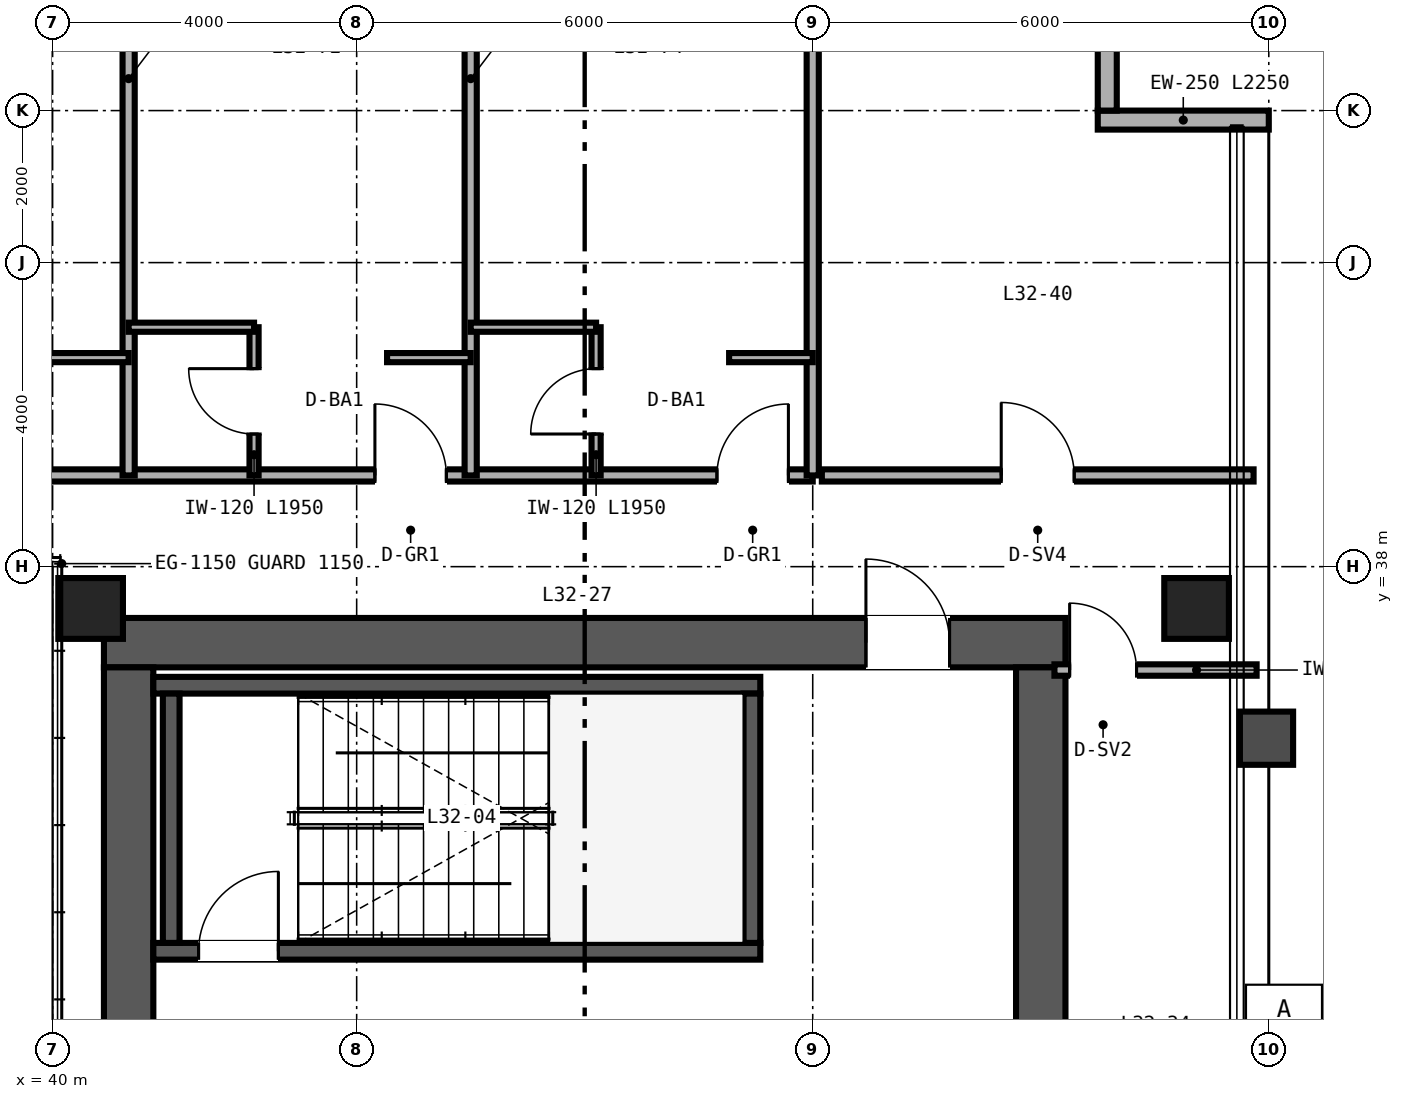
"""IFC4 building model, lengths in metres.
Left out: names, types, materials, properties, quantities, classifications, styles, units other than length and angle.
Written with IfcOpenShell. Run it as: python <this file> out.ifc"""

import sys

from ifc_helpers import new_model, si_unit, direction, frame, frame_2d, origin, origin_2d, place, context, subcontext, project, spatial, rectangle, hollow_rectangle, extrude, source, transform, mapped, element, fill, save


model = new_model("IFC4")
c1 = context("Model", 3, precision=1e-05, world=origin(), true_north=direction((0.0, 1.0)))
c2 = subcontext(c1, "Body", "Model", "MODEL_VIEW")
j1 = project(units=[si_unit("LENGTHUNIT", "METRE"), si_unit("PLANEANGLEUNIT", "RADIAN")], contexts=[c1])
p1 = place(None, origin())
s1 = spatial("IfcSite", under=j1, at=p1, CompositionType="ELEMENT")
p2 = place(p1, origin())
s2 = spatial("IfcBuilding", under=s1, at=p2, CompositionType="ELEMENT")
p3 = place(p2, frame((0.0, 0.0, 129.6)))
s3 = spatial("IfcBuildingStorey", under=s2, at=p3, CompositionType="ELEMENT", Elevation=129.6)
p4 = place(p3, frame((40.675, 37.0, 0.0), z_axis=(0.0, 0.0, 1.0), x_axis=(1.0, 0.0, 0.0)))
e1 = element("IfcWall", 1, at=p4, inside=s3, PredefinedType="SHEAR", context=c2, shape_type="SweptSolid", body=[
    extrude(rectangle(XDim=12.65, YDim=0.65, at=frame_2d((6.325, 0.0))), origin(), (0.0, 0.0, 1.0), 3.36),
])
p5 = place(p4, frame((10.025, 0.0, 0.0)))
e2 = element("IfcOpeningElement", 2, at=p5, cuts=e1, PredefinedType="OPENING", context=c2, shape_type="SweptSolid", body=[
    extrude(rectangle(XDim=1.1, YDim=2.15, at=frame_2d((0.55, 1.075))), frame((0.0, 0.335, 0.0), z_axis=(0.0, -1.0, 0.0), x_axis=(1.0, 0.0, 0.0)), (0.0, 0.0, 1.0), 0.67),
])
for number, where, z_axis, x_axis in (
    (3, (41.0, 15.325, 0.0), (0.0, 0.0, 1.0), (0.0, 1.0, 0.0)),
    (4, (53.0, 15.325, 0.0), (0.0, 0.0, 1.0), (0.0, 1.0, 0.0)),
):
    element("IfcWall", number, at=place(p3, frame(where, z_axis=z_axis, x_axis=x_axis)), inside=s3, PredefinedType="SHEAR", context=c2, shape_type="SweptSolid", body=[
        extrude(rectangle(XDim=21.35, YDim=0.65, at=frame_2d((10.675, 0.0))), origin(), (0.0, 0.0, 1.0), 3.36),
    ])
p6 = place(p3, frame((41.325, 32.94, 0.0), z_axis=(0.0, 0.0, 1.0), x_axis=(1.0, 0.0, 0.0)))
e5 = element("IfcWall", 5, at=p6, inside=s3, PredefinedType="SHEAR", context=c2, shape_type="SweptSolid", body=[
    extrude(rectangle(XDim=7.985, YDim=0.22, at=frame_2d((3.993, 0.0))), origin(), (0.0, 0.0, 1.0), 3.4),
])
p7 = place(p6, frame((0.595, 0.0, 0.0)))
e6 = element("IfcOpeningElement", 6, at=p7, cuts=e5, PredefinedType="OPENING", context=c2, shape_type="SweptSolid", body=[
    extrude(rectangle(XDim=1.05, YDim=2.15, at=frame_2d((0.525, 1.075))), frame((0.0, 0.12, 0.0), z_axis=(0.0, -1.0, 0.0), x_axis=(1.0, 0.0, 0.0)), (0.0, 0.0, 1.0), 0.24),
])
p8 = place(p3, frame((41.325, 36.44, 0.0), z_axis=(0.0, 0.0, 1.0), x_axis=(1.0, 0.0, 0.0)))
e7 = element("IfcWall", 7, at=p8, inside=s3, PredefinedType="SHEAR", context=c2, shape_type="SweptSolid", body=[
    extrude(rectangle(XDim=7.985, YDim=0.22, at=frame_2d((3.993, 0.0))), origin(), (0.0, 0.0, 1.0), 3.4),
])
for number, where, z_axis, x_axis in (
    (8, (41.56, 33.05, 0.0), (0.0, 0.0, 1.0), (0.0, 1.0, 0.0)),
    (9, (49.2, 33.05, 0.0), (0.0, 0.0, 1.0), (0.0, 1.0, 0.0)),
):
    element("IfcWall", number, at=place(p3, frame(where, z_axis=z_axis, x_axis=x_axis)), inside=s3, PredefinedType="SHEAR", context=c2, shape_type="SweptSolid", body=[
        extrude(rectangle(XDim=3.28, YDim=0.22, at=frame_2d((1.64, 0.0))), origin(), (0.0, 0.0, 1.0), 3.4),
    ])
m1 = source(origin(), c2, "Body", "SweptSolid", [
    extrude(hollow_rectangle(XDim=0.85, YDim=0.8, WallThickness=0.032, at=origin_2d()), origin(), (0.0, 0.0, 1.0), 3.36),
])
for number, where, z_axis, x_axis in (
    (10, (40.5, 37.45, 0.0), (0.0, 0.0, 1.0), (1.0, 0.0, 0.0)),
    (11, (55.05, 37.45, 0.0), (0.0, 0.0, 1.0), (1.0, 0.0, 0.0)),
):
    element("IfcColumn", number, at=place(p3, frame(where, z_axis=z_axis, x_axis=x_axis)), inside=s3, PredefinedType="COLUMN", context=c2, shape_type="MappedRepresentation", body=[
        mapped(m1, transform((0.0, 0.0, 0.0), scale=1.0)),
    ])
p9 = place(p3, frame((56.0, 43.875, 0.0), z_axis=(0.0, 0.0, 1.0), x_axis=(-1.0, 0.0, 0.0)))
e12 = element("IfcWall", 12, at=p9, inside=s3, PredefinedType="SOLIDWALL", context=c2, shape_type="SweptSolid", body=[
    extrude(rectangle(XDim=2.25, YDim=0.25, at=frame_2d((1.125, 0.0))), origin(), (0.0, 0.0, 1.0), 3.36),
])
p10 = place(p3, frame((53.875, 44.0, 0.0), z_axis=(0.0, 0.0, 1.0), x_axis=(0.0, 1.0, 0.0)))
e13 = element("IfcWall", 13, at=p10, inside=s3, PredefinedType="SOLIDWALL", context=c2, shape_type="SweptSolid", body=[
    extrude(rectangle(XDim=2.0, YDim=0.25, at=frame_2d((1.0, 0.0))), origin(), (0.0, 0.0, 1.0), 3.36),
])
p11 = place(p3, frame((53.18, 36.64, 0.0), z_axis=(0.0, 0.0, 1.0), x_axis=(1.0, 0.0, 0.0)))
e14 = element("IfcWall", 14, at=p11, inside=s3, PredefinedType="PARTITIONING", context=c2, shape_type="SweptSolid", body=[
    extrude(rectangle(XDim=2.66, YDim=0.15, at=frame_2d((1.33, 0.0))), origin(), (0.0, 0.0, 1.0), 2.743),
])
p12 = place(p11, frame((0.2, 0.0, 0.0)))
e15 = element("IfcOpeningElement", 15, at=p12, cuts=e14, PredefinedType="OPENING", context=c2, shape_type="SweptSolid", body=[
    extrude(rectangle(XDim=0.88, YDim=2.15, at=frame_2d((0.44, 1.075))), frame((0.0, 0.085, 0.0), z_axis=(0.0, -1.0, 0.0), x_axis=(1.0, 0.0, 0.0)), (0.0, 0.0, 1.0), 0.17),
])
p13 = place(p3, frame((50.12, 39.2, 0.0), z_axis=(0.0, 0.0, 1.0), x_axis=(1.0, 0.0, 0.0)))
e16 = element("IfcWall", 16, at=p13, inside=s3, PredefinedType="PARTITIONING", context=c2, shape_type="SweptSolid", body=[
    extrude(rectangle(XDim=5.68, YDim=0.16, at=frame_2d((2.84, 0.0))), origin(), (0.0, 0.0, 1.0), 3.36),
])
p14 = place(p13, frame((2.36, 0.0, 0.0)))
e17 = element("IfcOpeningElement", 17, at=p14, cuts=e16, PredefinedType="OPENING", context=c2, shape_type="SweptSolid", body=[
    extrude(rectangle(XDim=0.96, YDim=2.15, at=frame_2d((0.48, 1.075))), frame((0.0, 0.09, 0.0), z_axis=(0.0, -1.0, 0.0), x_axis=(1.0, 0.0, 0.0)), (0.0, 0.0, 1.0), 0.18),
])
p15 = place(p3, frame((14.0, 39.2, 0.0), z_axis=(0.0, 0.0, 1.0), x_axis=(1.0, 0.0, 0.0)))
e18 = element("IfcWall", 18, at=p15, inside=s3, PredefinedType="PARTITIONING", context=c2, shape_type="SweptSolid", body=[
    extrude(rectangle(XDim=36.0, YDim=0.16, at=frame_2d((18.0, 0.0))), origin(), (0.0, 0.0, 1.0), 2.581),
])
p16 = place(p15, frame((3.14, 0.0, 0.0)))
e19 = element("IfcOpeningElement", 19, at=p16, cuts=e18, PredefinedType="OPENING", context=c2, shape_type="SweptSolid", body=[
    extrude(rectangle(XDim=0.94, YDim=2.15, at=frame_2d((0.47, 1.075))), frame((0.0, 0.09, 0.0), z_axis=(0.0, -1.0, 0.0), x_axis=(1.0, 0.0, 0.0)), (0.0, 0.0, 1.0), 0.18),
])
p17 = place(p15, frame((7.54, 0.0, 0.0)))
e20 = element("IfcOpeningElement", 20, at=p17, cuts=e18, PredefinedType="OPENING", context=c2, shape_type="SweptSolid", body=[
    extrude(rectangle(XDim=0.94, YDim=2.15, at=frame_2d((0.47, 1.075))), frame((0.0, 0.09, 0.0), z_axis=(0.0, -1.0, 0.0), x_axis=(1.0, 0.0, 0.0)), (0.0, 0.0, 1.0), 0.18),
])
p18 = place(p15, frame((11.94, 0.0, 0.0)))
e21 = element("IfcOpeningElement", 21, at=p18, cuts=e18, PredefinedType="OPENING", context=c2, shape_type="SweptSolid", body=[
    extrude(rectangle(XDim=0.94, YDim=2.15, at=frame_2d((0.47, 1.075))), frame((0.0, 0.09, 0.0), z_axis=(0.0, -1.0, 0.0), x_axis=(1.0, 0.0, 0.0)), (0.0, 0.0, 1.0), 0.18),
])
p19 = place(p15, frame((15.02, 0.0, 0.0)))
e22 = element("IfcOpeningElement", 22, at=p19, cuts=e18, PredefinedType="OPENING", context=c2, shape_type="SweptSolid", body=[
    extrude(rectangle(XDim=0.96, YDim=2.15, at=frame_2d((0.48, 1.075))), frame((0.0, 0.09, 0.0), z_axis=(0.0, -1.0, 0.0), x_axis=(1.0, 0.0, 0.0)), (0.0, 0.0, 1.0), 0.18),
])
p20 = place(p15, frame((21.14, 0.0, 0.0)))
e23 = element("IfcOpeningElement", 23, at=p20, cuts=e18, PredefinedType="OPENING", context=c2, shape_type="SweptSolid", body=[
    extrude(rectangle(XDim=0.94, YDim=2.15, at=frame_2d((0.47, 1.075))), frame((0.0, 0.09, 0.0), z_axis=(0.0, -1.0, 0.0), x_axis=(1.0, 0.0, 0.0)), (0.0, 0.0, 1.0), 0.18),
])
p21 = place(p15, frame((24.79, 0.0, 0.0)))
e24 = element("IfcOpeningElement", 24, at=p21, cuts=e18, PredefinedType="OPENING", context=c2, shape_type="SweptSolid", body=[
    extrude(rectangle(XDim=0.94, YDim=2.15, at=frame_2d((0.47, 1.075))), frame((0.0, 0.09, 0.0), z_axis=(0.0, -1.0, 0.0), x_axis=(1.0, 0.0, 0.0)), (0.0, 0.0, 1.0), 0.18),
])
p22 = place(p15, frame((30.24, 0.0, 0.0)))
e25 = element("IfcOpeningElement", 25, at=p22, cuts=e18, PredefinedType="OPENING", context=c2, shape_type="SweptSolid", body=[
    extrude(rectangle(XDim=0.94, YDim=2.15, at=frame_2d((0.47, 1.075))), frame((0.0, 0.09, 0.0), z_axis=(0.0, -1.0, 0.0), x_axis=(1.0, 0.0, 0.0)), (0.0, 0.0, 1.0), 0.18),
])
p23 = place(p15, frame((34.74, 0.0, 0.0)))
e26 = element("IfcOpeningElement", 26, at=p23, cuts=e18, PredefinedType="OPENING", context=c2, shape_type="SweptSolid", body=[
    extrude(rectangle(XDim=0.94, YDim=2.15, at=frame_2d((0.47, 1.075))), frame((0.0, 0.09, 0.0), z_axis=(0.0, -1.0, 0.0), x_axis=(1.0, 0.0, 0.0)), (0.0, 0.0, 1.0), 0.18),
])
p24 = place(p3, frame((50.0, 39.2, 0.0), z_axis=(0.0, 0.0, 1.0), x_axis=(0.0, 1.0, 0.0)))
e27 = element("IfcWall", 27, at=p24, inside=s3, PredefinedType="PARTITIONING", context=c2, shape_type="SweptSolid", body=[
    extrude(rectangle(XDim=10.44, YDim=0.16, at=frame_2d((5.22, 0.0))), origin(), (0.0, 0.0, 1.0), 2.667),
])
p25 = place(p3, frame((41.0, 39.2, 0.0), z_axis=(0.0, 0.0, 1.0), x_axis=(0.0, 1.0, 0.0)))
e28 = element("IfcWall", 28, at=p25, inside=s3, PredefinedType="PARTITIONING", context=c2, shape_type="SweptSolid", body=[
    extrude(rectangle(XDim=10.44, YDim=0.16, at=frame_2d((5.22, 0.0))), origin(), (0.0, 0.0, 1.0), 2.823),
])
p26 = place(p3, frame((39.9, 40.75, 0.0), z_axis=(0.0, 0.0, 1.0), x_axis=(1.0, 0.0, 0.0)))
e29 = element("IfcWall", 29, at=p26, inside=s3, PredefinedType="PARTITIONING", context=c2, shape_type="SweptSolid", body=[
    extrude(rectangle(XDim=1.1, YDim=0.12, at=frame_2d((0.55, 0.0))), origin(), (0.0, 0.0, 1.0), 2.581),
])
p27 = place(p3, frame((45.5, 39.2, 0.0), z_axis=(0.0, 0.0, 1.0), x_axis=(0.0, 1.0, 0.0)))
e30 = element("IfcWall", 30, at=p27, inside=s3, PredefinedType="PARTITIONING", context=c2, shape_type="SweptSolid", body=[
    extrude(rectangle(XDim=10.44, YDim=0.16, at=frame_2d((5.22, 0.0))), origin(), (0.0, 0.0, 1.0), 2.667),
])
p28 = place(p3, frame((42.65, 39.2, 0.0), z_axis=(0.0, 0.0, 1.0), x_axis=(0.0, 1.0, 0.0)))
e31 = element("IfcWall", 31, at=p28, inside=s3, PredefinedType="PARTITIONING", context=c2, shape_type="SweptSolid", body=[
    extrude(rectangle(XDim=1.95, YDim=0.12, at=frame_2d((0.975, 0.0))), origin(), (0.0, 0.0, 1.0), 3.36),
])
p29 = place(p28, frame((0.545, 0.0, 0.0)))
e32 = element("IfcOpeningElement", 32, at=p29, cuts=e31, PredefinedType="OPENING", context=c2, shape_type="SweptSolid", body=[
    extrude(rectangle(XDim=0.86, YDim=2.1, at=frame_2d((0.43, 1.05))), frame((0.0, 0.07, 0.0), z_axis=(0.0, -1.0, 0.0), x_axis=(1.0, 0.0, 0.0)), (0.0, 0.0, 1.0), 0.14),
])
p30 = place(p3, frame((41.0, 41.15, 0.0), z_axis=(0.0, 0.0, 1.0), x_axis=(1.0, 0.0, 0.0)))
e33 = element("IfcWall", 33, at=p30, inside=s3, PredefinedType="PARTITIONING", context=c2, shape_type="SweptSolid", body=[
    extrude(rectangle(XDim=1.65, YDim=0.12, at=frame_2d((0.825, 0.0))), origin(), (0.0, 0.0, 1.0), 3.36),
])
p31 = place(p3, frame((44.4, 40.75, 0.0), z_axis=(0.0, 0.0, 1.0), x_axis=(1.0, 0.0, 0.0)))
e34 = element("IfcWall", 34, at=p31, inside=s3, PredefinedType="PARTITIONING", context=c2, shape_type="SweptSolid", body=[
    extrude(rectangle(XDim=1.1, YDim=0.12, at=frame_2d((0.55, 0.0))), origin(), (0.0, 0.0, 1.0), 3.36),
])
p32 = place(p3, frame((47.15, 39.2, 0.0), z_axis=(0.0, 0.0, 1.0), x_axis=(0.0, 1.0, 0.0)))
e35 = element("IfcWall", 35, at=p32, inside=s3, PredefinedType="PARTITIONING", context=c2, shape_type="SweptSolid", body=[
    extrude(rectangle(XDim=1.95, YDim=0.12, at=frame_2d((0.975, 0.0))), origin(), (0.0, 0.0, 1.0), 3.36),
])
p33 = place(p32, frame((0.545, 0.0, 0.0)))
e36 = element("IfcOpeningElement", 36, at=p33, cuts=e35, PredefinedType="OPENING", context=c2, shape_type="SweptSolid", body=[
    extrude(rectangle(XDim=0.86, YDim=2.1, at=frame_2d((0.43, 1.05))), frame((0.0, 0.07, 0.0), z_axis=(0.0, -1.0, 0.0), x_axis=(1.0, 0.0, 0.0)), (0.0, 0.0, 1.0), 0.14),
])
p34 = place(p3, frame((45.5, 41.15, 0.0), z_axis=(0.0, 0.0, 1.0), x_axis=(1.0, 0.0, 0.0)))
e37 = element("IfcWall", 37, at=p34, inside=s3, PredefinedType="PARTITIONING", context=c2, shape_type="SweptSolid", body=[
    extrude(rectangle(XDim=1.65, YDim=0.12, at=frame_2d((0.825, 0.0))), origin(), (0.0, 0.0, 1.0), 3.36),
])
p35 = place(p3, frame((48.9, 40.75, 0.0), z_axis=(0.0, 0.0, 1.0), x_axis=(1.0, 0.0, 0.0)))
e38 = element("IfcWall", 38, at=p35, inside=s3, PredefinedType="PARTITIONING", context=c2, shape_type="SweptSolid", body=[
    extrude(rectangle(XDim=1.1, YDim=0.12, at=frame_2d((0.55, 0.0))), origin(), (0.0, 0.0, 1.0), 3.36),
])
m2 = source(origin(), c2, "Body", "SweptSolid", [
    extrude(rectangle(XDim=1.05, YDim=2.15, at=frame_2d((0.525, 1.075))), frame((0.0, 0.025, 0.0), z_axis=(0.0, -1.0, 0.0), x_axis=(1.0, 0.0, 0.0)), (0.0, 0.0, 1.0), 0.05),
])
p36 = place(p7, origin())
e39 = element("IfcDoor", 39, at=p36, inside=s3, OperationType="SINGLE_SWING_RIGHT", PredefinedType="DOOR", context=c2, shape_type="MappedRepresentation", body=[
    mapped(m2, transform((0.0, 0.0, 0.0), scale=1.0)),
])
fill(e6, e39)
m3 = source(origin(), c2, "Body", "SweptSolid", [
    extrude(rectangle(XDim=1.1, YDim=2.15, at=frame_2d((0.55, 1.075))), frame((0.0, 0.025, 0.0), z_axis=(0.0, -1.0, 0.0), x_axis=(1.0, 0.0, 0.0)), (0.0, 0.0, 1.0), 0.05),
])
p37 = place(p5, origin())
e40 = element("IfcDoor", 40, at=p37, inside=s3, OperationType="SINGLE_SWING_LEFT", PredefinedType="DOOR", context=c2, shape_type="MappedRepresentation", body=[
    mapped(m3, transform((0.0, 0.0, 0.0), scale=1.0)),
])
fill(e2, e40)
m4 = source(origin(), c2, "Body", "SweptSolid", [
    extrude(rectangle(XDim=0.88, YDim=2.15, at=frame_2d((0.44, 1.075))), frame((0.0, 0.025, 0.0), z_axis=(0.0, -1.0, 0.0), x_axis=(1.0, 0.0, 0.0)), (0.0, 0.0, 1.0), 0.05),
])
p38 = place(p12, origin())
e41 = element("IfcDoor", 41, at=p38, inside=s3, OperationType="SINGLE_SWING_LEFT", PredefinedType="DOOR", context=c2, shape_type="MappedRepresentation", body=[
    mapped(m4, transform((0.0, 0.0, 0.0), scale=1.0)),
])
fill(e15, e41)
m5 = source(origin(), c2, "Body", "SweptSolid", [
    extrude(rectangle(XDim=0.96, YDim=2.15, at=frame_2d((0.48, 1.075))), frame((0.0, 0.025, 0.0), z_axis=(0.0, -1.0, 0.0), x_axis=(1.0, 0.0, 0.0)), (0.0, 0.0, 1.0), 0.05),
])
p39 = place(p14, origin())
e42 = element("IfcDoor", 42, at=p39, inside=s3, OperationType="SINGLE_SWING_LEFT", PredefinedType="DOOR", context=c2, shape_type="MappedRepresentation", body=[
    mapped(m5, transform((0.0, 0.0, 0.0), scale=1.0)),
])
fill(e17, e42)
m6 = source(origin(), c2, "Body", "SweptSolid", [
    extrude(rectangle(XDim=0.86, YDim=2.1, at=frame_2d((0.43, 1.05))), frame((0.0, 0.025, 0.0), z_axis=(0.0, -1.0, 0.0), x_axis=(1.0, 0.0, 0.0)), (0.0, 0.0, 1.0), 0.05),
])
p40 = place(p29, origin())
e43 = element("IfcDoor", 43, at=p40, inside=s3, OperationType="SINGLE_SWING_RIGHT", PredefinedType="DOOR", context=c2, shape_type="MappedRepresentation", body=[
    mapped(m6, transform((0.0, 0.0, 0.0), scale=1.0)),
])
fill(e32, e43)
p41 = place(p33, origin())
e44 = element("IfcDoor", 44, at=p41, inside=s3, OperationType="SINGLE_SWING_LEFT", PredefinedType="DOOR", context=c2, shape_type="MappedRepresentation", body=[
    mapped(m6, transform((0.0, 0.0, 0.0), scale=1.0)),
])
fill(e36, e44)
m7 = source(origin(), c2, "Body", "SweptSolid", [
    extrude(rectangle(XDim=0.94, YDim=2.15, at=frame_2d((0.47, 1.075))), frame((0.0, 0.025, 0.0), z_axis=(0.0, -1.0, 0.0), x_axis=(1.0, 0.0, 0.0)), (0.0, 0.0, 1.0), 0.05),
])
p42 = place(p22, origin())
e45 = element("IfcDoor", 45, at=p42, inside=s3, OperationType="SINGLE_SWING_LEFT", PredefinedType="DOOR", context=c2, shape_type="MappedRepresentation", body=[
    mapped(m7, transform((0.0, 0.0, 0.0), scale=1.0)),
])
fill(e25, e45)
p43 = place(p23, origin())
e46 = element("IfcDoor", 46, at=p43, inside=s3, OperationType="SINGLE_SWING_RIGHT", PredefinedType="DOOR", context=c2, shape_type="MappedRepresentation", body=[
    mapped(m7, transform((0.0, 0.0, 0.0), scale=1.0)),
])
fill(e26, e46)
save(model, sys.argv[1])
